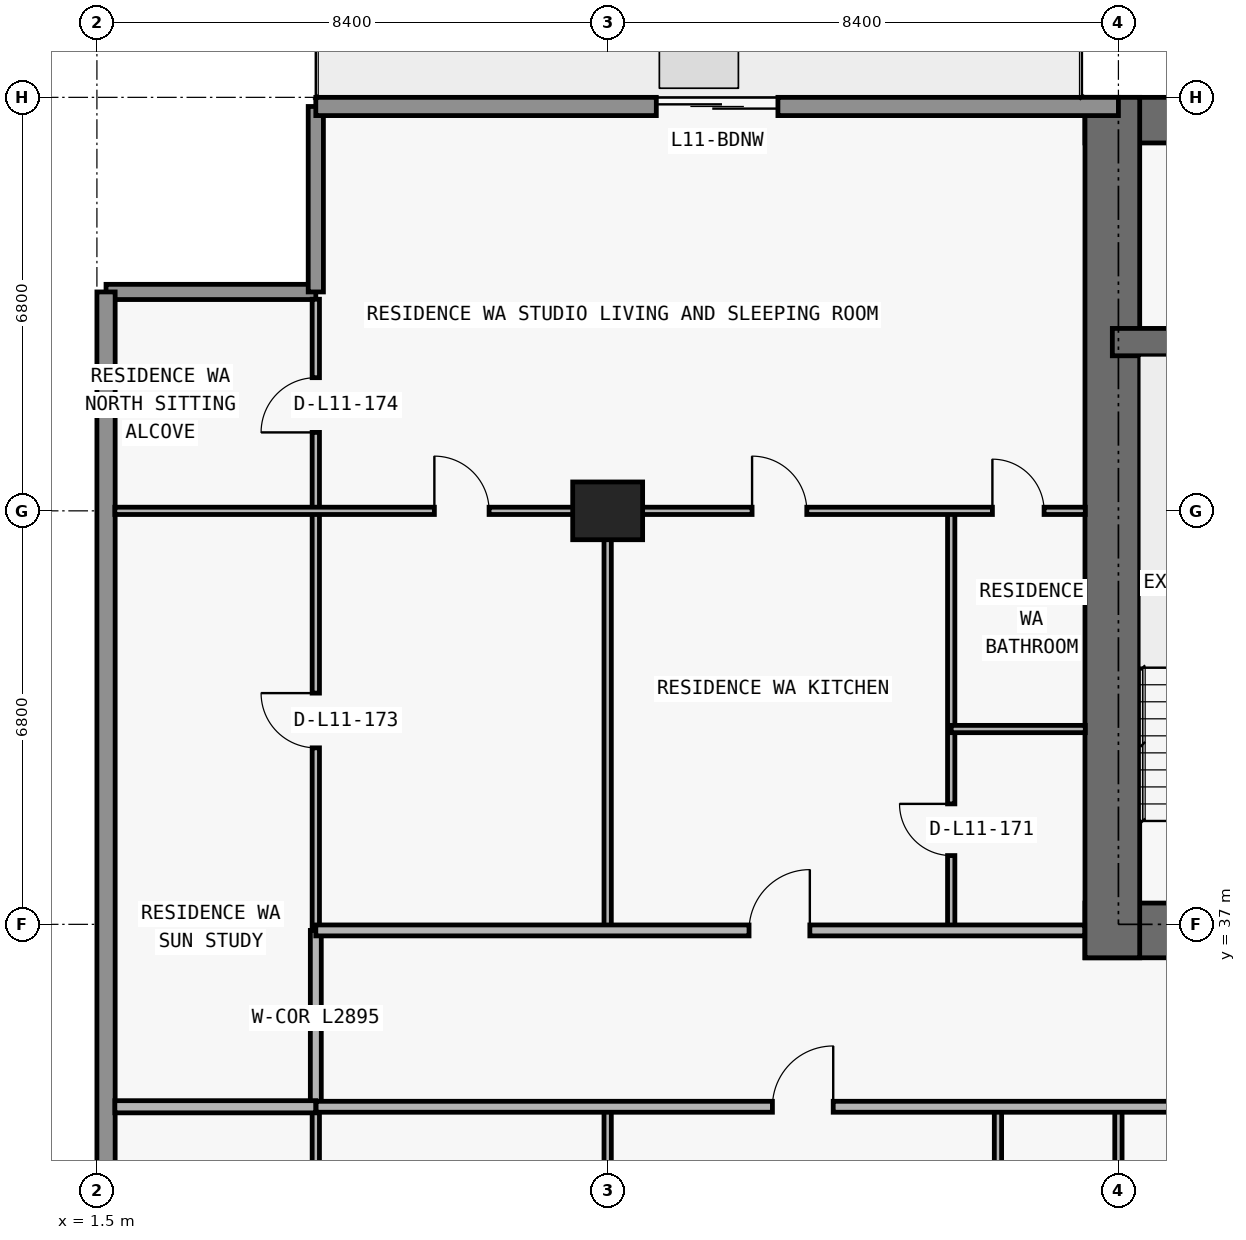
"""IFC4 building model, lengths in metres.
Left out: names, types, materials, properties, quantities, classifications, styles, units other than length and angle.
Written with IfcOpenShell. Run it as: python <this file> out.ifc"""

import sys

from ifc_helpers import new_model, si_unit, direction, frame, frame_2d, origin, origin_2d, place, context, subcontext, project, spatial, rectangle, extrude, element, fill, save


model = new_model("IFC4")
c1 = context("Model", 3, precision=1e-05, world=origin(), true_north=direction((0.0, 1.0)))
c2 = subcontext(c1, "Body", "Model", "MODEL_VIEW")
j1 = project(units=[si_unit("LENGTHUNIT", "METRE"), si_unit("PLANEANGLEUNIT", "RADIAN")], contexts=[c1])
p1 = place(None, origin())
s1 = spatial("IfcSite", under=j1, at=p1, CompositionType="ELEMENT")
p2 = place(p1, origin())
s2 = spatial("IfcBuilding", under=s1, at=p2, CompositionType="ELEMENT")
p3 = place(p2, frame((0.0, 0.0, 46.5)))
s3 = spatial("IfcBuildingStorey", under=s2, at=p3, CompositionType="ELEMENT", Elevation=46.5)
p4 = place(p3, frame((9.9, 43.8, 0.0), z_axis=(0.0, 0.0, 1.0), x_axis=(1.0, 0.0, 0.0)))
e1 = element("IfcColumn", 1, at=p4, inside=s3, PredefinedType="COLUMN", context=c2, shape_type="SweptSolid", body=[
    extrude(rectangle(XDim=1.15, YDim=0.95, at=origin_2d()), origin(), (0.0, 0.0, 1.0), 3.05),
])
p5 = place(p3, frame((17.75, 36.9, 0.0), z_axis=(0.0, 0.0, 1.0), x_axis=(1.0, 0.0, 0.0)))
e2 = element("IfcWall", 2, at=p5, inside=s3, PredefinedType="SHEAR", context=c2, shape_type="SweptSolid", body=[
    extrude(rectangle(XDim=42.3, YDim=0.9, at=frame_2d((21.15, 0.0))), origin(), (0.0, 0.0, 1.0), 3.05),
])
p6 = place(p5, frame((14.55, 0.0, 0.0)))
e3 = element("IfcOpeningElement", 3, at=p6, cuts=e2, PredefinedType="OPENING", context=c2, shape_type="SweptSolid", body=[
    extrude(rectangle(XDim=1.1, YDim=2.15, at=frame_2d((0.55, 1.075))), frame((0.0, 0.46, 0.0), z_axis=(0.0, -1.0, 0.0), x_axis=(1.0, 0.0, 0.0)), (0.0, 0.0, 1.0), 0.92),
])
p7 = place(p5, frame((6.4, 0.0, 0.0)))
e4 = element("IfcOpeningElement", 4, at=p7, cuts=e2, PredefinedType="OPENING", context=c2, shape_type="SweptSolid", body=[
    extrude(rectangle(XDim=1.05, YDim=2.15, at=frame_2d((0.525, 1.075))), frame((0.0, 0.46, 0.0), z_axis=(0.0, -1.0, 0.0), x_axis=(1.0, 0.0, 0.0)), (0.0, 0.0, 1.0), 0.92),
])
p8 = place(p5, frame((34.9, 0.0, 0.0)))
e5 = element("IfcOpeningElement", 5, at=p8, cuts=e2, PredefinedType="OPENING", context=c2, shape_type="SweptSolid", body=[
    extrude(rectangle(XDim=1.05, YDim=2.15, at=frame_2d((0.525, 1.075))), frame((0.0, 0.46, 0.0), z_axis=(0.0, -1.0, 0.0), x_axis=(1.0, 0.0, 0.0)), (0.0, 0.0, 1.0), 0.92),
])
p9 = place(p5, frame((11.012, 0.0, 0.0)))
e6 = element("IfcOpeningElement", 6, at=p9, cuts=e2, PredefinedType="OPENING", context=c2, shape_type="SweptSolid", body=[
    extrude(rectangle(XDim=1.05, YDim=2.15, at=frame_2d((0.525, 1.075))), frame((0.0, 0.46, 0.0), z_axis=(0.0, -1.0, 0.0), x_axis=(1.0, 0.0, 0.0)), (0.0, 0.0, 1.0), 0.92),
])
p10 = place(p5, frame((24.25, 0.0, 0.0)))
e7 = element("IfcOpeningElement", 7, at=p10, cuts=e2, PredefinedType="OPENING", context=c2, shape_type="SweptSolid", body=[
    extrude(rectangle(XDim=1.05, YDim=2.15, at=frame_2d((0.525, 1.075))), frame((0.0, 0.46, 0.0), z_axis=(0.0, -1.0, 0.0), x_axis=(1.0, 0.0, 0.0)), (0.0, 0.0, 1.0), 0.92),
])
p11 = place(p3, frame((17.75, 50.225, 0.0), z_axis=(0.0, 0.0, 1.0), x_axis=(1.0, 0.0, 0.0)))
e8 = element("IfcWall", 8, at=p11, inside=s3, PredefinedType="SHEAR", context=c2, shape_type="SweptSolid", body=[
    extrude(rectangle(XDim=42.3, YDim=0.75, at=frame_2d((21.15, 0.0))), origin(), (0.0, 0.0, 1.0), 3.05),
])
p12 = place(p3, frame((18.2, 36.45, 0.0), z_axis=(0.0, 0.0, 1.0), x_axis=(0.0, 1.0, 0.0)))
e9 = element("IfcWall", 9, at=p12, inside=s3, PredefinedType="SHEAR", context=c2, shape_type="SweptSolid", body=[
    extrude(rectangle(XDim=14.15, YDim=0.9, at=frame_2d((7.075, 0.0))), origin(), (0.0, 0.0, 1.0), 3.05),
])
p13 = place(p3, frame((18.2, 46.575, 0.0), z_axis=(0.0, 0.0, 1.0), x_axis=(1.0, 0.0, 0.0)))
e10 = element("IfcWall", 10, at=p13, inside=s3, PredefinedType="SHEAR", context=c2, shape_type="SweptSolid", body=[
    extrude(rectangle(XDim=41.4, YDim=0.45, at=frame_2d((20.7, 0.0))), origin(), (0.0, 0.0, 1.0), 3.05),
])
p14 = place(p13, frame((7.675, 0.0, 0.0)))
e11 = element("IfcOpeningElement", 11, at=p14, cuts=e10, PredefinedType="OPENING", context=c2, shape_type="SweptSolid", body=[
    extrude(rectangle(XDim=1.05, YDim=2.15, at=frame_2d((0.525, 1.075))), frame((0.0, 0.235, 0.0), z_axis=(0.0, -1.0, 0.0), x_axis=(1.0, 0.0, 0.0)), (0.0, 0.0, 1.0), 0.47),
])
p15 = place(p13, frame((32.725, 0.0, 0.0)))
e12 = element("IfcOpeningElement", 12, at=p15, cuts=e10, PredefinedType="OPENING", context=c2, shape_type="SweptSolid", body=[
    extrude(rectangle(XDim=1.05, YDim=2.15, at=frame_2d((0.525, 1.075))), frame((0.0, 0.235, 0.0), z_axis=(0.0, -1.0, 0.0), x_axis=(1.0, 0.0, 0.0)), (0.0, 0.0, 1.0), 0.47),
])
p16 = place(p3, frame((1.65, 47.4, 0.0), z_axis=(0.0, 0.0, 1.0), x_axis=(1.0, 0.0, 0.0)))
e13 = element("IfcWall", 13, at=p16, inside=s3, PredefinedType="ELEMENTEDWALL", context=c2, shape_type="SweptSolid", body=[
    extrude(rectangle(XDim=3.45, YDim=0.25, at=frame_2d((1.725, 0.0))), origin(), (0.0, 0.0, 1.0), 3.05),
])
p17 = place(p3, frame((5.1, 47.4, 0.0), z_axis=(0.0, 0.0, 1.0), x_axis=(0.0, 1.0, 0.0)))
e14 = element("IfcWall", 14, at=p17, inside=s3, PredefinedType="ELEMENTEDWALL", context=c2, shape_type="SweptSolid", body=[
    extrude(rectangle(XDim=3.05, YDim=0.25, at=frame_2d((1.525, 0.0))), origin(), (0.0, 0.0, 1.0), 3.05),
])
p18 = place(p3, frame((1.65, 26.8, 0.0), z_axis=(0.0, 0.0, 1.0), x_axis=(0.0, 1.0, 0.0)))
e15 = element("IfcWall", 15, at=p18, inside=s3, PredefinedType="STANDARD", context=c2, shape_type="SweptSolid", body=[
    extrude(rectangle(XDim=20.6, YDim=0.3, at=frame_2d((10.3, 0.0))), origin(), (0.0, 0.0, 1.0), 3.05),
])
p19 = place(p3, frame((5.1, 50.45, 0.0), z_axis=(0.0, 0.0, 1.0), x_axis=(1.0, 0.0, 0.0)))
e16 = element("IfcWall", 16, at=p19, inside=s3, PredefinedType="STANDARD", context=c2, shape_type="SweptSolid", body=[
    extrude(rectangle(XDim=13.2, YDim=0.3, at=frame_2d((6.6, 0.0))), origin(), (0.0, 0.0, 1.0), 3.05),
])
p20 = place(p19, frame((5.6, 0.0, 0.0)))
e17 = element("IfcOpeningElement", 17, at=p20, cuts=e16, PredefinedType="OPENING", context=c2, shape_type="SweptSolid", body=[
    extrude(rectangle(XDim=2.0, YDim=2.3, at=frame_2d((1.0, 1.15))), frame((0.0, 0.16, 0.0), z_axis=(0.0, -1.0, 0.0), x_axis=(1.0, 0.0, 0.0)), (0.0, 0.0, 1.0), 0.32),
])
p21 = place(p3, frame((5.1, 28.84, 0.0), z_axis=(0.0, 0.0, 1.0), x_axis=(0.0, 1.0, 0.0)))
e18 = element("IfcWall", 18, at=p21, inside=s3, PredefinedType="PARTITIONING", context=c2, shape_type="SweptSolid", body=[
    extrude(rectangle(XDim=5.16, YDim=0.12, at=frame_2d((2.58, 0.0))), origin(), (0.0, 0.0, 1.0), 3.05),
])
p22 = place(p3, frame((5.1, 34.005, 0.0), z_axis=(0.0, 0.0, 1.0), x_axis=(0.0, 1.0, 0.0)))
e19 = element("IfcWall", 19, at=p22, inside=s3, PredefinedType="PARTITIONING", context=c2, shape_type="SweptSolid", body=[
    extrude(rectangle(XDim=2.895, YDim=0.18, at=frame_2d((1.448, 0.0))), origin(), (0.0, 0.0, 1.0), 3.05),
])
p23 = place(p3, frame((5.1, 36.905, 0.0), z_axis=(0.0, 0.0, 1.0), x_axis=(0.0, 1.0, 0.0)))
e20 = element("IfcWall", 20, at=p23, inside=s3, PredefinedType="PARTITIONING", context=c2, shape_type="SweptSolid", body=[
    extrude(rectangle(XDim=10.375, YDim=0.12, at=frame_2d((5.188, 0.0))), origin(), (0.0, 0.0, 1.0), 3.05),
])
p24 = place(p23, frame((2.998, 0.0, 0.0)))
e21 = element("IfcOpeningElement", 21, at=p24, cuts=e20, PredefinedType="OPENING", context=c2, shape_type="SweptSolid", body=[
    extrude(rectangle(XDim=0.9, YDim=2.15, at=frame_2d((0.45, 1.075))), frame((0.0, 0.07, 0.0), z_axis=(0.0, -1.0, 0.0), x_axis=(1.0, 0.0, 0.0)), (0.0, 0.0, 1.0), 0.14),
])
p25 = place(p23, frame((8.185, 0.0, 0.0)))
e22 = element("IfcOpeningElement", 22, at=p25, cuts=e20, PredefinedType="OPENING", context=c2, shape_type="SweptSolid", body=[
    extrude(rectangle(XDim=0.9, YDim=2.15, at=frame_2d((0.45, 1.075))), frame((0.0, 0.07, 0.0), z_axis=(0.0, -1.0, 0.0), x_axis=(1.0, 0.0, 0.0)), (0.0, 0.0, 1.0), 0.14),
])
p26 = place(p3, frame((9.9, 28.84, 0.0), z_axis=(0.0, 0.0, 1.0), x_axis=(0.0, 1.0, 0.0)))
e23 = element("IfcWall", 23, at=p26, inside=s3, PredefinedType="PARTITIONING", context=c2, shape_type="SweptSolid", body=[
    extrude(rectangle(XDim=5.16, YDim=0.12, at=frame_2d((2.58, 0.0))), origin(), (0.0, 0.0, 1.0), 2.11),
])
p27 = place(p3, frame((9.9, 36.9, 0.0), z_axis=(0.0, 0.0, 1.0), x_axis=(0.0, 1.0, 0.0)))
e24 = element("IfcWall", 24, at=p27, inside=s3, PredefinedType="PARTITIONING", context=c2, shape_type="SweptSolid", body=[
    extrude(rectangle(XDim=6.9, YDim=0.12, at=frame_2d((3.45, 0.0))), origin(), (0.0, 0.0, 1.0), 2.11),
])
p28 = place(p3, frame((15.55, 36.9, 0.0), z_axis=(0.0, 0.0, 1.0), x_axis=(0.0, 1.0, 0.0)))
e25 = element("IfcWall", 25, at=p28, inside=s3, PredefinedType="PARTITIONING", context=c2, shape_type="SweptSolid", body=[
    extrude(rectangle(XDim=6.9, YDim=0.12, at=frame_2d((3.45, 0.0))), origin(), (0.0, 0.0, 1.0), 3.05),
])
p29 = place(p28, frame((1.231, 0.0, 0.0)))
e26 = element("IfcOpeningElement", 26, at=p29, cuts=e25, PredefinedType="OPENING", context=c2, shape_type="SweptSolid", body=[
    extrude(rectangle(XDim=0.85, YDim=2.1, at=frame_2d((0.425, 1.05))), frame((0.0, 0.07, 0.0), z_axis=(0.0, -1.0, 0.0), x_axis=(1.0, 0.0, 0.0)), (0.0, 0.0, 1.0), 0.14),
])
p30 = place(p3, frame((16.319, 28.84, 0.0), z_axis=(0.0, 0.0, 1.0), x_axis=(0.0, 1.0, 0.0)))
e27 = element("IfcWall", 27, at=p30, inside=s3, PredefinedType="PARTITIONING", context=c2, shape_type="SweptSolid", body=[
    extrude(rectangle(XDim=5.16, YDim=0.12, at=frame_2d((2.58, 0.0))), origin(), (0.0, 0.0, 1.0), 3.05),
])
p31 = place(p30, frame((2.155, 0.0, 0.0)))
e28 = element("IfcOpeningElement", 28, at=p31, cuts=e27, PredefinedType="OPENING", context=c2, shape_type="SweptSolid", body=[
    extrude(rectangle(XDim=0.85, YDim=2.1, at=frame_2d((0.425, 1.05))), frame((0.0, 0.07, 0.0), z_axis=(0.0, -1.0, 0.0), x_axis=(1.0, 0.0, 0.0)), (0.0, 0.0, 1.0), 0.14),
])
p32 = place(p3, frame((18.3, 28.84, 0.0), z_axis=(0.0, 0.0, 1.0), x_axis=(0.0, 1.0, 0.0)))
e29 = element("IfcWall", 29, at=p32, inside=s3, PredefinedType="PARTITIONING", context=c2, shape_type="SweptSolid", body=[
    extrude(rectangle(XDim=5.16, YDim=0.12, at=frame_2d((2.58, 0.0))), origin(), (0.0, 0.0, 1.0), 2.11),
])
p33 = place(p3, frame((1.795, 34.0, 0.0), z_axis=(0.0, 0.0, 1.0), x_axis=(1.0, 0.0, 0.0)))
e30 = element("IfcWall", 30, at=p33, inside=s3, PredefinedType="PARTITIONING", context=c2, shape_type="SweptSolid", body=[
    extrude(rectangle(XDim=3.305, YDim=0.2, at=frame_2d((1.653, 0.0))), origin(), (0.0, 0.0, 1.0), 3.05),
])
p34 = place(p3, frame((5.105, 34.0, 0.0), z_axis=(0.0, 0.0, 1.0), x_axis=(1.0, 0.0, 0.0)))
e31 = element("IfcWall", 31, at=p34, inside=s3, PredefinedType="PARTITIONING", context=c2, shape_type="SweptSolid", body=[
    extrude(rectangle(XDim=21.545, YDim=0.18, at=frame_2d((10.772, 0.0))), origin(), (0.0, 0.0, 1.0), 3.05),
])
p35 = place(p34, frame((7.504, 0.0, 0.0)))
e32 = element("IfcOpeningElement", 32, at=p35, cuts=e31, PredefinedType="OPENING", context=c2, shape_type="SweptSolid", body=[
    extrude(rectangle(XDim=1.0, YDim=2.2, at=frame_2d((0.5, 1.1))), frame((0.0, 0.1, 0.0), z_axis=(0.0, -1.0, 0.0), x_axis=(1.0, 0.0, 0.0)), (0.0, 0.0, 1.0), 0.2),
])
p36 = place(p3, frame((5.1, 36.9, 0.0), z_axis=(0.0, 0.0, 1.0), x_axis=(1.0, 0.0, 0.0)))
e33 = element("IfcWall", 33, at=p36, inside=s3, PredefinedType="PARTITIONING", context=c2, shape_type="SweptSolid", body=[
    extrude(rectangle(XDim=12.645, YDim=0.18, at=frame_2d((6.323, 0.0))), origin(), (0.0, 0.0, 1.0), 3.05),
])
p37 = place(p36, frame((7.125, 0.0, 0.0)))
e34 = element("IfcOpeningElement", 34, at=p37, cuts=e33, PredefinedType="OPENING", context=c2, shape_type="SweptSolid", body=[
    extrude(rectangle(XDim=1.0, YDim=2.2, at=frame_2d((0.5, 1.1))), frame((0.0, 0.1, 0.0), z_axis=(0.0, -1.0, 0.0), x_axis=(1.0, 0.0, 0.0)), (0.0, 0.0, 1.0), 0.2),
])
p38 = place(p3, frame((15.55, 40.212, 0.0), z_axis=(0.0, 0.0, 1.0), x_axis=(1.0, 0.0, 0.0)))
e35 = element("IfcWall", 35, at=p38, inside=s3, PredefinedType="PARTITIONING", context=c2, shape_type="SweptSolid", body=[
    extrude(rectangle(XDim=2.205, YDim=0.12, at=frame_2d((1.103, 0.0))), origin(), (0.0, 0.0, 1.0), 3.05),
])
p39 = place(p3, frame((1.795, 43.8, 0.0), z_axis=(0.0, 0.0, 1.0), x_axis=(1.0, 0.0, 0.0)))
e36 = element("IfcWall", 36, at=p39, inside=s3, PredefinedType="PARTITIONING", context=c2, shape_type="SweptSolid", body=[
    extrude(rectangle(XDim=15.96, YDim=0.12, at=frame_2d((7.98, 0.0))), origin(), (0.0, 0.0, 1.0), 2.339),
])
p40 = place(p39, frame((5.255, 0.0, 0.0)))
e37 = element("IfcOpeningElement", 37, at=p40, cuts=e36, PredefinedType="OPENING", context=c2, shape_type="SweptSolid", body=[
    extrude(rectangle(XDim=0.9, YDim=2.15, at=frame_2d((0.45, 1.075))), frame((0.0, 0.07, 0.0), z_axis=(0.0, -1.0, 0.0), x_axis=(1.0, 0.0, 0.0)), (0.0, 0.0, 1.0), 0.14),
])
p41 = place(p39, frame((10.48, 0.0, 0.0)))
e38 = element("IfcOpeningElement", 38, at=p41, cuts=e36, PredefinedType="OPENING", context=c2, shape_type="SweptSolid", body=[
    extrude(rectangle(XDim=0.9, YDim=2.15, at=frame_2d((0.45, 1.075))), frame((0.0, 0.07, 0.0), z_axis=(0.0, -1.0, 0.0), x_axis=(1.0, 0.0, 0.0)), (0.0, 0.0, 1.0), 0.14),
])
p42 = place(p39, frame((14.433, 0.0, 0.0)))
e39 = element("IfcOpeningElement", 39, at=p42, cuts=e36, PredefinedType="OPENING", context=c2, shape_type="SweptSolid", body=[
    extrude(rectangle(XDim=0.85, YDim=2.1, at=frame_2d((0.425, 1.05))), frame((0.0, 0.07, 0.0), z_axis=(0.0, -1.0, 0.0), x_axis=(1.0, 0.0, 0.0)), (0.0, 0.0, 1.0), 0.14),
])
p43 = place(p20, origin())
e40 = element("IfcDoor", 40, at=p43, inside=s3, OperationType="DOUBLE_DOOR_SLIDING", PredefinedType="DOOR", context=c2, shape_type="SweptSolid", body=[
    extrude(rectangle(XDim=2.0, YDim=2.3, at=frame_2d((1.0, 1.15))), frame((0.0, 0.025, 0.0), z_axis=(0.0, -1.0, 0.0), x_axis=(1.0, 0.0, 0.0)), (0.0, 0.0, 1.0), 0.05),
])
fill(e17, e40)
p44 = place(p35, origin())
e41 = element("IfcDoor", 41, at=p44, inside=s3, OperationType="SINGLE_SWING_RIGHT", PredefinedType="DOOR", context=c2, shape_type="SweptSolid", body=[
    extrude(rectangle(XDim=1.0, YDim=2.2, at=frame_2d((0.5, 1.1))), frame((0.0, 0.025, 0.0), z_axis=(0.0, -1.0, 0.0), x_axis=(1.0, 0.0, 0.0)), (0.0, 0.0, 1.0), 0.05),
])
fill(e32, e41)
p45 = place(p40, origin())
e42 = element("IfcDoor", 42, at=p45, inside=s3, OperationType="SINGLE_SWING_LEFT", PredefinedType="DOOR", context=c2, shape_type="SweptSolid", body=[
    extrude(rectangle(XDim=0.9, YDim=2.15, at=frame_2d((0.45, 1.075))), frame((0.0, 0.025, 0.0), z_axis=(0.0, -1.0, 0.0), x_axis=(1.0, 0.0, 0.0)), (0.0, 0.0, 1.0), 0.05),
])
fill(e37, e42)
p46 = place(p37, origin())
e43 = element("IfcDoor", 43, at=p46, inside=s3, OperationType="SINGLE_SWING_RIGHT", PredefinedType="DOOR", context=c2, shape_type="SweptSolid", body=[
    extrude(rectangle(XDim=1.0, YDim=2.2, at=frame_2d((0.5, 1.1))), frame((0.0, 0.025, 0.0), z_axis=(0.0, -1.0, 0.0), x_axis=(1.0, 0.0, 0.0)), (0.0, 0.0, 1.0), 0.05),
])
fill(e34, e43)
p47 = place(p41, origin())
e44 = element("IfcDoor", 44, at=p47, inside=s3, OperationType="SINGLE_SWING_LEFT", PredefinedType="DOOR", context=c2, shape_type="SweptSolid", body=[
    extrude(rectangle(XDim=0.9, YDim=2.15, at=frame_2d((0.45, 1.075))), frame((0.0, 0.025, 0.0), z_axis=(0.0, -1.0, 0.0), x_axis=(1.0, 0.0, 0.0)), (0.0, 0.0, 1.0), 0.05),
])
fill(e38, e44)
p48 = place(p29, origin())
e45 = element("IfcDoor", 45, at=p48, inside=s3, OperationType="SINGLE_SWING_RIGHT", PredefinedType="DOOR", context=c2, shape_type="SweptSolid", body=[
    extrude(rectangle(XDim=0.85, YDim=2.1, at=frame_2d((0.425, 1.05))), frame((0.0, 0.025, 0.0), z_axis=(0.0, -1.0, 0.0), x_axis=(1.0, 0.0, 0.0)), (0.0, 0.0, 1.0), 0.05),
])
fill(e26, e45)
p49 = place(p42, origin())
e46 = element("IfcDoor", 46, at=p49, inside=s3, OperationType="SINGLE_SWING_LEFT", PredefinedType="DOOR", context=c2, shape_type="SweptSolid", body=[
    extrude(rectangle(XDim=0.85, YDim=2.1, at=frame_2d((0.425, 1.05))), frame((0.0, 0.025, 0.0), z_axis=(0.0, -1.0, 0.0), x_axis=(1.0, 0.0, 0.0)), (0.0, 0.0, 1.0), 0.05),
])
fill(e39, e46)
p50 = place(p24, origin())
e47 = element("IfcDoor", 47, at=p50, inside=s3, OperationType="SINGLE_SWING_RIGHT", PredefinedType="DOOR", context=c2, shape_type="SweptSolid", body=[
    extrude(rectangle(XDim=0.9, YDim=2.15, at=frame_2d((0.45, 1.075))), frame((0.0, 0.025, 0.0), z_axis=(0.0, -1.0, 0.0), x_axis=(1.0, 0.0, 0.0)), (0.0, 0.0, 1.0), 0.05),
])
fill(e21, e47)
p51 = place(p25, origin())
e48 = element("IfcDoor", 48, at=p51, inside=s3, OperationType="SINGLE_SWING_LEFT", PredefinedType="DOOR", context=c2, shape_type="SweptSolid", body=[
    extrude(rectangle(XDim=0.9, YDim=2.15, at=frame_2d((0.45, 1.075))), frame((0.0, 0.025, 0.0), z_axis=(0.0, -1.0, 0.0), x_axis=(1.0, 0.0, 0.0)), (0.0, 0.0, 1.0), 0.05),
])
fill(e22, e48)
save(model, sys.argv[1])
